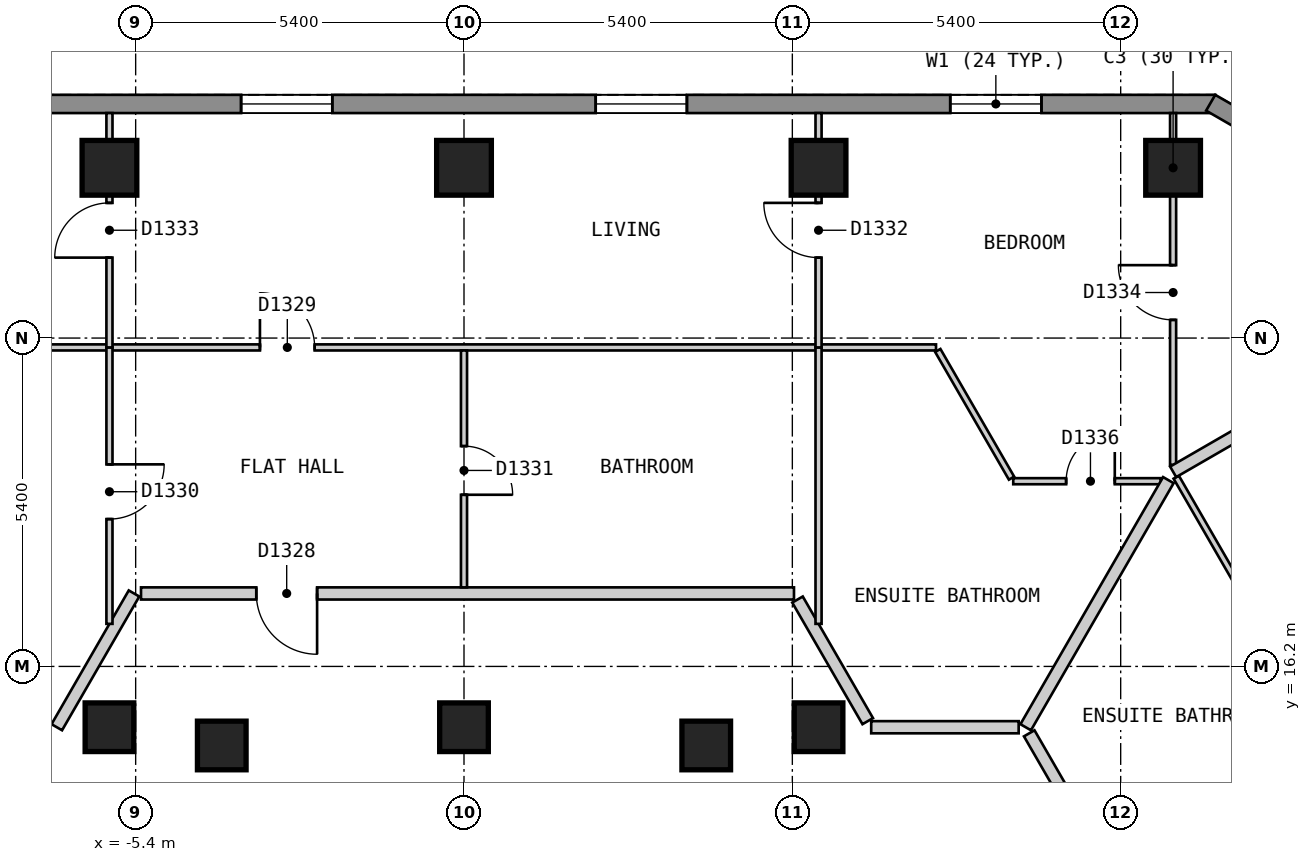
"""IFC4 building model, lengths in metres.
Left out: names, types, materials, properties, quantities, classifications, styles, units other than length and angle.
Written with IfcOpenShell. Run it as: python <this file> out.ifc"""

import sys

from ifc_helpers import new_model, si_unit, direction, frame, frame_2d, origin, origin_2d, place, context, subcontext, project, spatial, polyline, rectangle, outline, extrude, element, fill, save


model = new_model("IFC4")
c1 = context("Model", 3, precision=1e-05, world=origin(), true_north=direction((0.0, 1.0)))
c2 = subcontext(c1, "Body", "Model", "MODEL_VIEW")
j1 = project(units=[si_unit("LENGTHUNIT", "METRE"), si_unit("PLANEANGLEUNIT", "RADIAN")], contexts=[c1])
p1 = place(None, origin())
s1 = spatial("IfcSite", under=j1, at=p1, CompositionType="ELEMENT")
p2 = place(p1, origin())
s2 = spatial("IfcBuilding", under=s1, at=p2, CompositionType="ELEMENT")
p3 = place(p2, frame((0.0, 0.0, 135.6)))
s3 = spatial("IfcBuildingStorey", under=s2, at=p3, CompositionType="ELEMENT", Elevation=135.6)
for number, where, z_axis, x_axis in (
    (1, (11.662, 24.4, 0.0), (0.0, 0.0, 1.0), (-1.0, 0.0, 0.0)),
    (2, (5.831, 24.4, 0.0), (0.0, 0.0, 1.0), (-1.0, 0.0, 0.0)),
    (3, (0.0, 24.4, 0.0), (0.0, 0.0, 1.0), (-1.0, 0.0, 0.0)),
    (4, (-5.831, 24.4, 0.0), (0.0, 0.0, 1.0), (-1.0, 0.0, 0.0)),
):
    element("IfcColumn", number, at=place(p3, frame(where, z_axis=z_axis, x_axis=x_axis)), inside=s3, PredefinedType="COLUMN", context=c2, shape_type="SweptSolid", body=[
        extrude(rectangle(XDim=0.9, YDim=0.9, at=origin_2d()), origin(), (0.0, 0.0, 1.0), 3.0),
    ])
for number, where, z_axis, x_axis in (
    (5, (5.831, 15.2, 0.0), (0.0, 0.0, 1.0), (-1.0, 0.0, 0.0)),
    (6, (3.984, 14.9, 0.0), (0.0, 0.0, 1.0), (1.0, 0.0, 0.0)),
    (7, (0.0, 15.2, 0.0), (0.0, 0.0, 1.0), (-1.0, 0.0, 0.0)),
    (8, (-3.984, 14.9, 0.0), (0.0, 0.0, 1.0), (1.0, 0.0, 0.0)),
    (9, (-5.831, 15.2, 0.0), (0.0, 0.0, 1.0), (-1.0, 0.0, 0.0)),
):
    element("IfcColumn", number, at=place(p3, frame(where, z_axis=z_axis, x_axis=x_axis)), inside=s3, PredefinedType="COLUMN", context=c2, shape_type="SweptSolid", body=[
        extrude(rectangle(XDim=0.8, YDim=0.8, at=origin_2d()), origin(), (0.0, 0.0, 1.0), 3.0),
    ])
p4 = place(p3, frame((12.355, 25.45, 0.0), z_axis=(0.0, 0.0, 1.0), x_axis=(-1.0, 0.0, 0.0)))
e10 = element("IfcWall", 10, at=p4, inside=s3, PredefinedType="SOLIDWALL", context=c2, shape_type="SweptSolid", body=[
    extrude(outline(polyline([(0.0, -0.15), (24.71, -0.15), (24.63, 0.15), (0.08, 0.15), (0.0, -0.15)])), origin(), (0.0, 0.0, 1.0), 2.7),
])
p5 = place(p4, frame((2.858, 0.0, 0.15)))
e11 = element("IfcOpeningElement", 11, at=p5, cuts=e10, PredefinedType="OPENING", context=c2, shape_type="SweptSolid", body=[
    extrude(rectangle(XDim=1.5, YDim=2.1, at=frame_2d((0.75, 1.05))), frame((0.0, 0.16, 0.0), z_axis=(0.0, -1.0, 0.0), x_axis=(1.0, 0.0, 0.0)), (0.0, 0.0, 1.0), 0.32),
])
p6 = place(p4, frame((8.689, 0.0, 0.15)))
e12 = element("IfcOpeningElement", 12, at=p6, cuts=e10, PredefinedType="OPENING", context=c2, shape_type="SweptSolid", body=[
    extrude(rectangle(XDim=1.5, YDim=2.1, at=frame_2d((0.75, 1.05))), frame((0.0, 0.16, 0.0), z_axis=(0.0, -1.0, 0.0), x_axis=(1.0, 0.0, 0.0)), (0.0, 0.0, 1.0), 0.32),
])
p7 = place(p4, frame((14.521, 0.0, 0.15)))
e13 = element("IfcOpeningElement", 13, at=p7, cuts=e10, PredefinedType="OPENING", context=c2, shape_type="SweptSolid", body=[
    extrude(rectangle(XDim=1.5, YDim=2.1, at=frame_2d((0.75, 1.05))), frame((0.0, 0.16, 0.0), z_axis=(0.0, -1.0, 0.0), x_axis=(1.0, 0.0, 0.0)), (0.0, 0.0, 1.0), 0.32),
])
p8 = place(p4, frame((20.352, 0.0, 0.15)))
e14 = element("IfcOpeningElement", 14, at=p8, cuts=e10, PredefinedType="OPENING", context=c2, shape_type="SweptSolid", body=[
    extrude(rectangle(XDim=1.5, YDim=2.1, at=frame_2d((0.75, 1.05))), frame((0.0, 0.16, 0.0), z_axis=(0.0, -1.0, 0.0), x_axis=(1.0, 0.0, 0.0)), (0.0, 0.0, 1.0), 0.32),
])
p9 = place(p3, frame((16.61, 22.97, 0.0), z_axis=(0.0, 0.0, 1.0), x_axis=(-0.866022959057, 0.500004234368, 0.0)))
e15 = element("IfcWall", 15, at=p9, inside=s3, PredefinedType="SOLIDWALL", context=c2, shape_type="SweptSolid", body=[
    extrude(outline(polyline([(0.0, -0.15), (5.0, -0.15), (4.92, 0.15), (0.08, 0.15), (0.0, -0.15)])), origin(), (0.0, 0.0, 1.0), 2.7),
])
p10 = place(p9, frame((0.65, 0.0, 0.15)))
e16 = element("IfcOpeningElement", 16, at=p10, cuts=e15, PredefinedType="OPENING", context=c2, shape_type="SweptSolid", body=[
    extrude(rectangle(XDim=1.2, YDim=2.1, at=frame_2d((0.6, 1.05))), frame((0.0, 0.16, 0.0), z_axis=(0.0, -1.0, 0.0), x_axis=(1.0, 0.0, 0.0)), (0.0, 0.0, 1.0), 0.32),
])
p11 = place(p3, frame((5.485, 17.3, 0.0), z_axis=(0.0, 0.0, 1.0), x_axis=(0.500027479704, -0.866009537788, 0.0)))
e17 = element("IfcWall", 17, at=p11, inside=s3, PredefinedType="PARTITIONING", context=c2, shape_type="SweptSolid", body=[
    extrude(rectangle(XDim=2.309, YDim=0.2, at=frame_2d((1.155, 0.0))), origin(), (0.0, 0.0, 1.0), 2.7),
])
p12 = place(p3, frame((9.296, 15.1, 0.0), z_axis=(0.0, 0.0, 1.0), x_axis=(0.499974024244, -0.866040400375, 0.0)))
e18 = element("IfcWall", 18, at=p12, inside=s3, PredefinedType="PARTITIONING", context=c2, shape_type="SweptSolid", body=[
    extrude(rectangle(XDim=16.857, YDim=0.2, at=frame_2d((8.429, 0.0))), origin(), (0.0, 0.0, 1.0), 2.7),
])
p13 = place(p12, frame((5.209, 0.0, 0.0)))
e19 = element("IfcOpeningElement", 19, at=p13, cuts=e18, PredefinedType="OPENING", context=c2, shape_type="SweptSolid", body=[
    extrude(rectangle(XDim=1.0, YDim=2.1, at=frame_2d((0.5, 1.05))), frame((0.0, 0.11, 0.0), z_axis=(0.0, -1.0, 0.0), x_axis=(1.0, 0.0, 0.0)), (0.0, 0.0, 1.0), 0.22),
])
p14 = place(p3, frame((6.697, 15.2, 0.0), z_axis=(0.0, 0.0, 1.0), x_axis=(1.0, 0.0, 0.0)))
e20 = element("IfcWall", 20, at=p14, inside=s3, PredefinedType="PARTITIONING", context=c2, shape_type="SweptSolid", body=[
    extrude(rectangle(XDim=2.425, YDim=0.2, at=frame_2d((1.212, 0.0))), origin(), (0.0, 0.0, 1.0), 2.7),
])
p15 = place(p3, frame((-5.312, 17.4, 0.0), z_axis=(0.0, 0.0, 1.0), x_axis=(1.0, 0.0, 0.0)))
e21 = element("IfcWall", 21, at=p15, inside=s3, PredefinedType="PARTITIONING", context=c2, shape_type="SweptSolid", body=[
    extrude(rectangle(XDim=10.739, YDim=0.2, at=frame_2d((5.37, 0.0))), origin(), (0.0, 0.0, 1.0), 2.7),
])
p16 = place(p15, frame((1.896, 0.0, 0.0)))
e22 = element("IfcOpeningElement", 22, at=p16, cuts=e21, PredefinedType="OPENING", context=c2, shape_type="SweptSolid", body=[
    extrude(rectangle(XDim=1.0, YDim=2.1, at=frame_2d((0.5, 1.05))), frame((0.0, 0.11, 0.0), z_axis=(0.0, -1.0, 0.0), x_axis=(1.0, 0.0, 0.0)), (0.0, 0.0, 1.0), 0.22),
])
p17 = place(p3, frame((-6.697, 15.2, 0.0), z_axis=(0.0, 0.0, 1.0), x_axis=(0.499963722229, 0.866046347752, 0.0)))
e23 = element("IfcWall", 23, at=p17, inside=s3, PredefinedType="PARTITIONING", context=c2, shape_type="SweptSolid", body=[
    extrude(rectangle(XDim=2.54, YDim=0.2, at=frame_2d((1.27, 0.0))), origin(), (0.0, 0.0, 1.0), 2.7),
])
p18 = place(p3, frame((7.792, 21.396, 0.0), z_axis=(0.0, 0.0, 1.0), x_axis=(0.50012328804, -0.865954211699, 0.0)))
e24 = element("IfcWall", 24, at=p18, inside=s3, PredefinedType="PARTITIONING", context=c2, shape_type="SweptSolid", body=[
    extrude(rectangle(XDim=2.425, YDim=0.1, at=frame_2d((1.213, 0.0))), origin(), (0.0, 0.0, 1.0), 2.7),
])
p19 = place(p3, frame((11.713, 19.313, 0.0), z_axis=(0.0, 0.0, 1.0), x_axis=(0.499999523185, -0.866025679073, 0.0)))
e25 = element("IfcWall", 25, at=p19, inside=s3, PredefinedType="PARTITIONING", context=c2, shape_type="SweptSolid", body=[
    extrude(rectangle(XDim=21.738, YDim=0.1, at=frame_2d((10.869, 0.0))), origin(), (0.0, 0.0, 1.0), 2.7),
])
p20 = place(p19, frame((7.654, 0.0, 0.0)))
e26 = element("IfcOpeningElement", 26, at=p20, cuts=e25, PredefinedType="OPENING", context=c2, shape_type="SweptSolid", body=[
    extrude(rectangle(XDim=0.9, YDim=2.1, at=frame_2d((0.45, 1.05))), frame((0.0, 0.06, 0.0), z_axis=(0.0, -1.0, 0.0), x_axis=(1.0, 0.0, 0.0)), (0.0, 0.0, 1.0), 0.12),
])
p21 = place(p19, frame((13.202, 0.0, 0.0)))
e27 = element("IfcOpeningElement", 27, at=p21, cuts=e25, PredefinedType="OPENING", context=c2, shape_type="SweptSolid", body=[
    extrude(rectangle(XDim=0.8, YDim=2.1, at=frame_2d((0.4, 1.05))), frame((0.0, 0.06, 0.0), z_axis=(0.0, -1.0, 0.0), x_axis=(1.0, 0.0, 0.0)), (0.0, 0.0, 1.0), 0.12),
])
p22 = place(p19, frame((2.242, 0.0, 0.0)))
e28 = element("IfcOpeningElement", 28, at=p22, cuts=e25, PredefinedType="OPENING", context=c2, shape_type="SweptSolid", body=[
    extrude(rectangle(XDim=0.8, YDim=2.1, at=frame_2d((0.4, 1.05))), frame((0.0, 0.06, 0.0), z_axis=(0.0, -1.0, 0.0), x_axis=(1.0, 0.0, 0.0)), (0.0, 0.0, 1.0), 0.12),
])
p23 = place(p19, frame((18.696, 0.0, 0.0)))
e29 = element("IfcOpeningElement", 29, at=p23, cuts=e25, PredefinedType="OPENING", context=c2, shape_type="SweptSolid", body=[
    extrude(rectangle(XDim=0.8, YDim=2.1, at=frame_2d((0.4, 1.05))), frame((0.0, 0.06, 0.0), z_axis=(0.0, -1.0, 0.0), x_axis=(1.0, 0.0, 0.0)), (0.0, 0.0, 1.0), 0.12),
])
p24 = place(p3, frame((9.033, 19.246, 0.0), z_axis=(0.0, 0.0, 1.0), x_axis=(1.0, 0.0, 0.0)))
e30 = element("IfcWall", 30, at=p24, inside=s3, PredefinedType="PARTITIONING", context=c2, shape_type="SweptSolid", body=[
    extrude(rectangle(XDim=2.425, YDim=0.1, at=frame_2d((1.212, 0.0))), origin(), (0.0, 0.0, 1.0), 2.7),
])
p25 = place(p24, frame((0.87, 0.0, 0.0)))
e31 = element("IfcOpeningElement", 31, at=p25, cuts=e30, PredefinedType="OPENING", context=c2, shape_type="SweptSolid", body=[
    extrude(rectangle(XDim=0.8, YDim=2.1, at=frame_2d((0.4, 1.05))), frame((0.0, 0.06, 0.0), z_axis=(0.0, -1.0, 0.0), x_axis=(1.0, 0.0, 0.0)), (0.0, 0.0, 1.0), 0.12),
])
p26 = place(p3, frame((-7.706, 21.446, 0.0), z_axis=(0.0, 0.0, 1.0), x_axis=(1.0, 0.0, 0.0)))
e32 = element("IfcWall", 32, at=p26, inside=s3, PredefinedType="PARTITIONING", context=c2, shape_type="SweptSolid", body=[
    extrude(rectangle(XDim=15.469, YDim=0.1, at=frame_2d((7.734, 0.0))), origin(), (0.0, 0.0, 1.0), 2.7),
])
p27 = place(p26, frame((4.35, 0.0, 0.0)))
e33 = element("IfcOpeningElement", 33, at=p27, cuts=e32, PredefinedType="OPENING", context=c2, shape_type="SweptSolid", body=[
    extrude(rectangle(XDim=0.9, YDim=2.1, at=frame_2d((0.45, 1.05))), frame((0.0, 0.06, 0.0), z_axis=(0.0, -1.0, 0.0), x_axis=(1.0, 0.0, 0.0)), (0.0, 0.0, 1.0), 0.12),
])
p28 = place(p3, frame((5.831, 16.9, 0.0), z_axis=(0.0, 0.0, 1.0), x_axis=(0.0, 1.0, 0.0)))
e34 = element("IfcWall", 34, at=p28, inside=s3, PredefinedType="PARTITIONING", context=c2, shape_type="SweptSolid", body=[
    extrude(rectangle(XDim=4.546, YDim=0.1, at=frame_2d((2.273, 0.0))), origin(), (0.0, 0.0, 1.0), 2.7),
])
p29 = place(p3, frame((11.662, 19.514, 0.0), z_axis=(0.0, 0.0, 1.0), x_axis=(0.0, 1.0, 0.0)))
e35 = element("IfcWall", 35, at=p29, inside=s3, PredefinedType="PARTITIONING", context=c2, shape_type="SweptSolid", body=[
    extrude(rectangle(XDim=5.786, YDim=0.1, at=frame_2d((2.893, 0.0))), origin(), (0.0, 0.0, 1.0), 2.7),
])
p30 = place(p29, frame((2.385, 0.0, 0.0)))
e36 = element("IfcOpeningElement", 36, at=p30, cuts=e35, PredefinedType="OPENING", context=c2, shape_type="SweptSolid", body=[
    extrude(rectangle(XDim=0.9, YDim=2.1, at=frame_2d((0.45, 1.05))), frame((0.0, 0.06, 0.0), z_axis=(0.0, -1.0, 0.0), x_axis=(1.0, 0.0, 0.0)), (0.0, 0.0, 1.0), 0.12),
])
p31 = place(p3, frame((0.0, 17.5, 0.0), z_axis=(0.0, 0.0, 1.0), x_axis=(0.0, 1.0, 0.0)))
e37 = element("IfcWall", 37, at=p31, inside=s3, PredefinedType="PARTITIONING", context=c2, shape_type="SweptSolid", body=[
    extrude(rectangle(XDim=3.896, YDim=0.1, at=frame_2d((1.948, 0.0))), origin(), (0.0, 0.0, 1.0), 2.7),
])
p32 = place(p31, frame((1.523, 0.0, 0.0)))
e38 = element("IfcOpeningElement", 38, at=p32, cuts=e37, PredefinedType="OPENING", context=c2, shape_type="SweptSolid", body=[
    extrude(rectangle(XDim=0.8, YDim=2.1, at=frame_2d((0.4, 1.05))), frame((0.0, 0.06, 0.0), z_axis=(0.0, -1.0, 0.0), x_axis=(1.0, 0.0, 0.0)), (0.0, 0.0, 1.0), 0.12),
])
p33 = place(p3, frame((-5.831, 16.9, 0.0), z_axis=(0.0, 0.0, 1.0), x_axis=(0.0, 1.0, 0.0)))
e39 = element("IfcWall", 39, at=p33, inside=s3, PredefinedType="PARTITIONING", context=c2, shape_type="SweptSolid", body=[
    extrude(rectangle(XDim=4.546, YDim=0.1, at=frame_2d((2.273, 0.0))), origin(), (0.0, 0.0, 1.0), 2.7),
])
p34 = place(p33, frame((1.723, 0.0, 0.0)))
e40 = element("IfcOpeningElement", 40, at=p34, cuts=e39, PredefinedType="OPENING", context=c2, shape_type="SweptSolid", body=[
    extrude(rectangle(XDim=0.9, YDim=2.1, at=frame_2d((0.45, 1.05))), frame((0.0, 0.06, 0.0), z_axis=(0.0, -1.0, 0.0), x_axis=(1.0, 0.0, 0.0)), (0.0, 0.0, 1.0), 0.12),
])
p35 = place(p3, frame((10.854, 12.6, 0.0), z_axis=(0.0, 0.0, 1.0), x_axis=(0.86606561423, 0.499930346997, 0.0)))
e41 = element("IfcWall", 41, at=p35, inside=s3, PredefinedType="PARTITIONING", context=c2, shape_type="SweptSolid", body=[
    extrude(rectangle(XDim=4.1, YDim=0.1, at=frame_2d((2.05, 0.0))), origin(), (0.0, 0.0, 1.0), 2.7),
])
p36 = place(p3, frame((9.238, 15.2, 0.0), z_axis=(0.0, 0.0, 1.0), x_axis=(0.49993863487, 0.86606083006, 0.0)))
e42 = element("IfcWall", 42, at=p36, inside=s3, PredefinedType="PARTITIONING", context=c2, shape_type="SweptSolid", body=[
    extrude(rectangle(XDim=4.692, YDim=0.2, at=frame_2d((2.346, 0.0))), origin(), (0.0, 0.0, 1.0), 2.7),
])
p37 = place(p3, frame((11.663, 19.4, 0.0), z_axis=(0.0, 0.0, 1.0), x_axis=(0.865941558533, 0.500145196124, 0.0)))
e43 = element("IfcWall", 43, at=p37, inside=s3, PredefinedType="PARTITIONING", context=c2, shape_type="SweptSolid", body=[
    extrude(rectangle(XDim=5.899, YDim=0.2, at=frame_2d((2.949, 0.0))), origin(), (0.0, 0.0, 1.0), 2.7),
])
p38 = place(p3, frame((5.831, 21.446, 0.0), z_axis=(0.0, 0.0, 1.0), x_axis=(0.0, 1.0, 0.0)))
e44 = element("IfcWall", 44, at=p38, inside=s3, PredefinedType="PARTITIONING", context=c2, shape_type="SweptSolid", body=[
    extrude(rectangle(XDim=3.854, YDim=0.1, at=frame_2d((1.927, 0.0))), origin(), (0.0, 0.0, 1.0), 2.7),
])
p39 = place(p38, frame((1.477, 0.0, 0.0)))
e45 = element("IfcOpeningElement", 45, at=p39, cuts=e44, PredefinedType="OPENING", context=c2, shape_type="SweptSolid", body=[
    extrude(rectangle(XDim=0.9, YDim=2.1, at=frame_2d((0.45, 1.05))), frame((0.0, 0.06, 0.0), z_axis=(0.0, -1.0, 0.0), x_axis=(1.0, 0.0, 0.0)), (0.0, 0.0, 1.0), 0.12),
])
p40 = place(p3, frame((-5.831, 21.446, 0.0), z_axis=(0.0, 0.0, 1.0), x_axis=(0.0, 1.0, 0.0)))
e46 = element("IfcWall", 46, at=p40, inside=s3, PredefinedType="PARTITIONING", context=c2, shape_type="SweptSolid", body=[
    extrude(rectangle(XDim=3.854, YDim=0.1, at=frame_2d((1.927, 0.0))), origin(), (0.0, 0.0, 1.0), 2.7),
])
p41 = place(p40, frame((1.477, 0.0, 0.0)))
e47 = element("IfcOpeningElement", 47, at=p41, cuts=e46, PredefinedType="OPENING", context=c2, shape_type="SweptSolid", body=[
    extrude(rectangle(XDim=0.9, YDim=2.1, at=frame_2d((0.45, 1.05))), frame((0.0, 0.06, 0.0), z_axis=(0.0, -1.0, 0.0), x_axis=(1.0, 0.0, 0.0)), (0.0, 0.0, 1.0), 0.12),
])
p42 = place(p5, origin())
e48 = element("IfcWindow", 48, at=p42, inside=s3, PartitioningType="SINGLE_PANEL", PredefinedType="WINDOW", context=c2, shape_type="SweptSolid", body=[
    extrude(rectangle(XDim=1.5, YDim=2.1, at=frame_2d((0.75, 1.05))), frame((0.0, 0.03, 0.0), z_axis=(0.0, -1.0, 0.0), x_axis=(1.0, 0.0, 0.0)), (0.0, 0.0, 1.0), 0.06),
])
fill(e11, e48)
p43 = place(p6, origin())
e49 = element("IfcWindow", 49, at=p43, inside=s3, PartitioningType="SINGLE_PANEL", PredefinedType="WINDOW", context=c2, shape_type="SweptSolid", body=[
    extrude(rectangle(XDim=1.5, YDim=2.1, at=frame_2d((0.75, 1.05))), frame((0.0, 0.03, 0.0), z_axis=(0.0, -1.0, 0.0), x_axis=(1.0, 0.0, 0.0)), (0.0, 0.0, 1.0), 0.06),
])
fill(e12, e49)
p44 = place(p7, origin())
e50 = element("IfcWindow", 50, at=p44, inside=s3, PartitioningType="SINGLE_PANEL", PredefinedType="WINDOW", context=c2, shape_type="SweptSolid", body=[
    extrude(rectangle(XDim=1.5, YDim=2.1, at=frame_2d((0.75, 1.05))), frame((0.0, 0.03, 0.0), z_axis=(0.0, -1.0, 0.0), x_axis=(1.0, 0.0, 0.0)), (0.0, 0.0, 1.0), 0.06),
])
fill(e13, e50)
p45 = place(p16, origin())
e51 = element("IfcDoor", 51, at=p45, inside=s3, OperationType="SINGLE_SWING_RIGHT", PredefinedType="DOOR", context=c2, shape_type="SweptSolid", body=[
    extrude(rectangle(XDim=1.0, YDim=2.1, at=frame_2d((0.5, 1.05))), frame((0.0, 0.025, 0.0), z_axis=(0.0, -1.0, 0.0), x_axis=(1.0, 0.0, 0.0)), (0.0, 0.0, 1.0), 0.05),
])
fill(e22, e51)
p46 = place(p27, origin())
e52 = element("IfcDoor", 52, at=p46, inside=s3, OperationType="SINGLE_SWING_LEFT", PredefinedType="DOOR", context=c2, shape_type="SweptSolid", body=[
    extrude(rectangle(XDim=0.9, YDim=2.1, at=frame_2d((0.45, 1.05))), frame((0.0, 0.025, 0.0), z_axis=(0.0, -1.0, 0.0), x_axis=(1.0, 0.0, 0.0)), (0.0, 0.0, 1.0), 0.05),
])
fill(e33, e52)
p47 = place(p34, origin())
e53 = element("IfcDoor", 53, at=p47, inside=s3, OperationType="SINGLE_SWING_RIGHT", PredefinedType="DOOR", context=c2, shape_type="SweptSolid", body=[
    extrude(rectangle(XDim=0.9, YDim=2.1, at=frame_2d((0.45, 1.05))), frame((0.0, 0.025, 0.0), z_axis=(0.0, -1.0, 0.0), x_axis=(1.0, 0.0, 0.0)), (0.0, 0.0, 1.0), 0.05),
])
fill(e40, e53)
p48 = place(p32, origin())
e54 = element("IfcDoor", 54, at=p48, inside=s3, OperationType="SINGLE_SWING_LEFT", PredefinedType="DOOR", context=c2, shape_type="SweptSolid", body=[
    extrude(rectangle(XDim=0.8, YDim=2.1, at=frame_2d((0.4, 1.05))), frame((0.0, 0.025, 0.0), z_axis=(0.0, -1.0, 0.0), x_axis=(1.0, 0.0, 0.0)), (0.0, 0.0, 1.0), 0.05),
])
fill(e38, e54)
p49 = place(p39, origin())
e55 = element("IfcDoor", 55, at=p49, inside=s3, OperationType="SINGLE_SWING_RIGHT", PredefinedType="DOOR", context=c2, shape_type="SweptSolid", body=[
    extrude(rectangle(XDim=0.9, YDim=2.1, at=frame_2d((0.45, 1.05))), frame((0.0, 0.025, 0.0), z_axis=(0.0, -1.0, 0.0), x_axis=(1.0, 0.0, 0.0)), (0.0, 0.0, 1.0), 0.05),
])
fill(e45, e55)
p50 = place(p41, origin())
e56 = element("IfcDoor", 56, at=p50, inside=s3, OperationType="SINGLE_SWING_LEFT", PredefinedType="DOOR", context=c2, shape_type="SweptSolid", body=[
    extrude(rectangle(XDim=0.9, YDim=2.1, at=frame_2d((0.45, 1.05))), frame((0.0, 0.025, 0.0), z_axis=(0.0, -1.0, 0.0), x_axis=(1.0, 0.0, 0.0)), (0.0, 0.0, 1.0), 0.05),
])
fill(e47, e56)
p51 = place(p30, origin())
e57 = element("IfcDoor", 57, at=p51, inside=s3, OperationType="SINGLE_SWING_RIGHT", PredefinedType="DOOR", context=c2, shape_type="SweptSolid", body=[
    extrude(rectangle(XDim=0.9, YDim=2.1, at=frame_2d((0.45, 1.05))), frame((0.0, 0.025, 0.0), z_axis=(0.0, -1.0, 0.0), x_axis=(1.0, 0.0, 0.0)), (0.0, 0.0, 1.0), 0.05),
])
fill(e36, e57)
p52 = place(p25, origin())
e58 = element("IfcDoor", 58, at=p52, inside=s3, OperationType="SINGLE_SWING_RIGHT", PredefinedType="DOOR", context=c2, shape_type="SweptSolid", body=[
    extrude(rectangle(XDim=0.8, YDim=2.1, at=frame_2d((0.4, 1.05))), frame((0.0, 0.025, 0.0), z_axis=(0.0, -1.0, 0.0), x_axis=(1.0, 0.0, 0.0)), (0.0, 0.0, 1.0), 0.05),
])
fill(e31, e58)
save(model, sys.argv[1])
